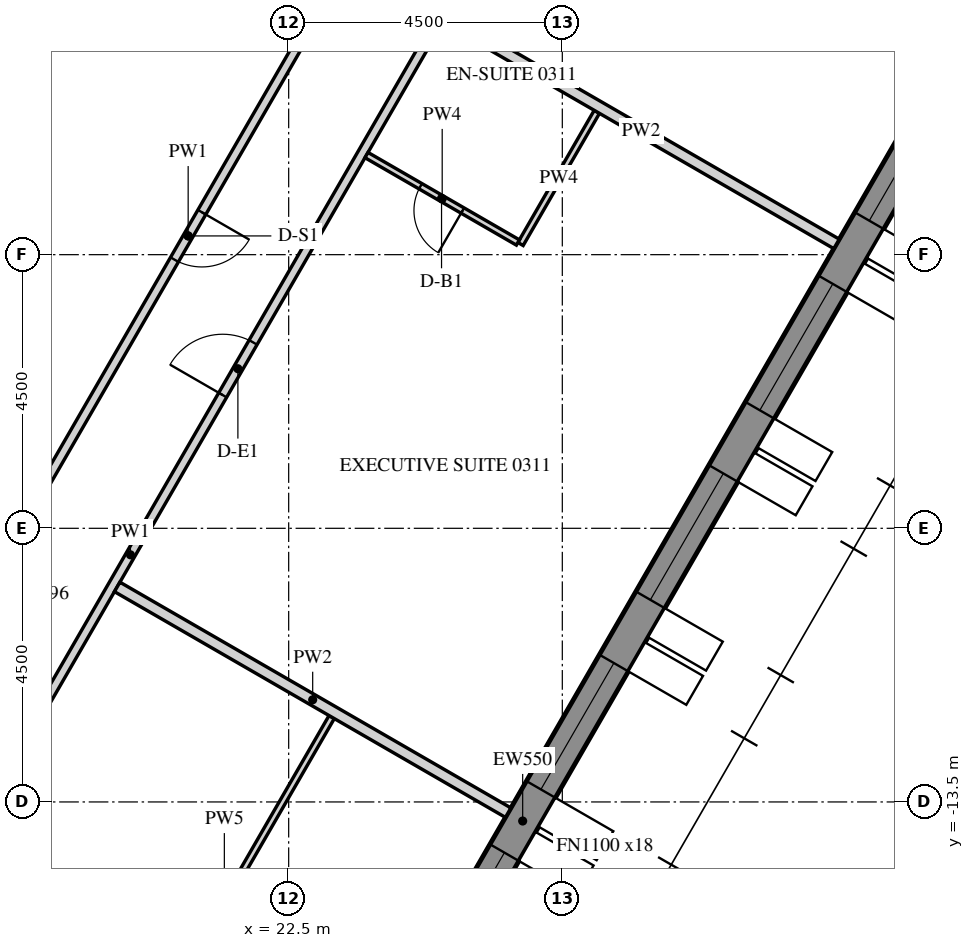
"""IFC4 building model, lengths in metres.
Left out: names, types, materials, properties, quantities, classifications, styles, units other than length and angle.
Written with IfcOpenShell. Run it as: python <this file> out.ifc"""

import sys

from ifc_helpers import new_model, si_unit, direction, frame, frame_2d, origin, place, context, subcontext, project, spatial, polyline, rectangle, outline, extrude, element, fill, save


model = new_model("IFC4")
c1 = context("Model", 3, precision=1e-05, world=origin(), true_north=direction((0.0, 1.0)))
c2 = subcontext(c1, "Body", "Model", "MODEL_VIEW")
j1 = project(units=[si_unit("LENGTHUNIT", "METRE"), si_unit("PLANEANGLEUNIT", "RADIAN")], contexts=[c1])
p1 = place(None, origin())
s1 = spatial("IfcSite", under=j1, at=p1, CompositionType="ELEMENT")
p2 = place(p1, origin())
s2 = spatial("IfcBuilding", under=s1, at=p2, CompositionType="ELEMENT")
p3 = place(p2, frame((0.0, 0.0, 60.9)))
s3 = spatial("IfcBuildingStorey", under=s2, at=p3, CompositionType="ELEMENT", Elevation=60.9)
p4 = place(p3, frame((18.83, -26.835, -0.15), z_axis=(0.0, 0.0, 1.0), x_axis=(0.500003800416, 0.866023209602, 0.0)))
e1 = element("IfcWall", 1, at=p4, inside=s3, PredefinedType="SOLIDWALL", context=c2, shape_type="SweptSolid", body=[
    extrude(outline(polyline([(-0.022, -0.275), (30.097, -0.275), (30.045, 0.275), (0.022, 0.275), (-0.022, -0.275)])), origin(), (0.0, 0.0, 1.0), 3.9),
])
p5 = place(p4, frame((1.236, 0.0, 1.05)))
e2 = element("IfcOpeningElement", 2, at=p5, cuts=e1, PredefinedType="OPENING", context=c2, shape_type="SweptSolid", body=[
    extrude(rectangle(XDim=2.4, YDim=2.4, at=frame_2d((1.2, 1.2))), frame((0.0, 0.285, 0.0), z_axis=(0.0, -1.0, 0.0), x_axis=(1.0, 0.0, 0.0)), (0.0, 0.0, 1.0), 0.57),
])
p6 = place(p4, frame((4.835, 0.0, 1.05)))
e3 = element("IfcOpeningElement", 3, at=p6, cuts=e1, PredefinedType="OPENING", context=c2, shape_type="SweptSolid", body=[
    extrude(rectangle(XDim=2.4, YDim=2.4, at=frame_2d((1.2, 1.2))), frame((0.0, 0.285, 0.0), z_axis=(0.0, -1.0, 0.0), x_axis=(1.0, 0.0, 0.0)), (0.0, 0.0, 1.0), 0.57),
])
p7 = place(p4, frame((8.436, 0.0, 1.05)))
e4 = element("IfcOpeningElement", 4, at=p7, cuts=e1, PredefinedType="OPENING", context=c2, shape_type="SweptSolid", body=[
    extrude(rectangle(XDim=2.4, YDim=2.4, at=frame_2d((1.2, 1.2))), frame((0.0, 0.285, 0.0), z_axis=(0.0, -1.0, 0.0), x_axis=(1.0, 0.0, 0.0)), (0.0, 0.0, 1.0), 0.57),
])
p8 = place(p4, frame((12.035, 0.0, 1.05)))
e5 = element("IfcOpeningElement", 5, at=p8, cuts=e1, PredefinedType="OPENING", context=c2, shape_type="SweptSolid", body=[
    extrude(rectangle(XDim=2.4, YDim=2.4, at=frame_2d((1.2, 1.2))), frame((0.0, 0.285, 0.0), z_axis=(0.0, -1.0, 0.0), x_axis=(1.0, 0.0, 0.0)), (0.0, 0.0, 1.0), 0.57),
])
p9 = place(p4, frame((15.635, 0.0, 1.05)))
e6 = element("IfcOpeningElement", 6, at=p9, cuts=e1, PredefinedType="OPENING", context=c2, shape_type="SweptSolid", body=[
    extrude(rectangle(XDim=2.4, YDim=2.4, at=frame_2d((1.2, 1.2))), frame((0.0, 0.285, 0.0), z_axis=(0.0, -1.0, 0.0), x_axis=(1.0, 0.0, 0.0)), (0.0, 0.0, 1.0), 0.57),
])
p10 = place(p4, frame((19.236, 0.0, 1.05)))
e7 = element("IfcOpeningElement", 7, at=p10, cuts=e1, PredefinedType="OPENING", context=c2, shape_type="SweptSolid", body=[
    extrude(rectangle(XDim=2.4, YDim=2.4, at=frame_2d((1.2, 1.2))), frame((0.0, 0.285, 0.0), z_axis=(0.0, -1.0, 0.0), x_axis=(1.0, 0.0, 0.0)), (0.0, 0.0, 1.0), 0.57),
])
p11 = place(p4, frame((22.835, 0.0, 1.05)))
e8 = element("IfcOpeningElement", 8, at=p11, cuts=e1, PredefinedType="OPENING", context=c2, shape_type="SweptSolid", body=[
    extrude(rectangle(XDim=2.4, YDim=2.4, at=frame_2d((1.2, 1.2))), frame((0.0, 0.285, 0.0), z_axis=(0.0, -1.0, 0.0), x_axis=(1.0, 0.0, 0.0)), (0.0, 0.0, 1.0), 0.57),
])
p12 = place(p4, frame((26.436, 0.0, 1.05)))
e9 = element("IfcOpeningElement", 9, at=p12, cuts=e1, PredefinedType="OPENING", context=c2, shape_type="SweptSolid", body=[
    extrude(rectangle(XDim=2.4, YDim=2.4, at=frame_2d((1.2, 1.2))), frame((0.0, 0.285, 0.0), z_axis=(0.0, -1.0, 0.0), x_axis=(1.0, 0.0, 0.0)), (0.0, 0.0, 1.0), 0.57),
])
p13 = place(p3, frame((13.928, -19.775, 0.0), z_axis=(0.0, 0.0, 1.0), x_axis=(0.50000450071, 0.866022805283, 0.0)))
e10 = element("IfcWall", 10, at=p13, inside=s3, PredefinedType="PARTITIONING", context=c2, shape_type="SweptSolid", body=[
    extrude(rectangle(XDim=23.877, YDim=0.15, at=frame_2d((11.938, 0.0))), origin(), (0.0, 0.0, 1.0), 2.988),
])
p14 = place(p13, frame((6.443, 0.0, 0.0)))
e11 = element("IfcOpeningElement", 11, at=p14, cuts=e10, PredefinedType="OPENING", context=c2, shape_type="SweptSolid", body=[
    extrude(rectangle(XDim=1.0, YDim=2.1, at=frame_2d((0.5, 1.05))), frame((0.0, 0.085, 0.0), z_axis=(0.0, -1.0, 0.0), x_axis=(1.0, 0.0, 0.0)), (0.0, 0.0, 1.0), 0.17),
])
p15 = place(p13, frame((14.972, 0.0, 0.0)))
e12 = element("IfcOpeningElement", 12, at=p15, cuts=e10, PredefinedType="OPENING", context=c2, shape_type="SweptSolid", body=[
    extrude(rectangle(XDim=1.0, YDim=2.1, at=frame_2d((0.5, 1.05))), frame((0.0, 0.085, 0.0), z_axis=(0.0, -1.0, 0.0), x_axis=(1.0, 0.0, 0.0)), (0.0, 0.0, 1.0), 0.17),
])
p16 = place(p3, frame((23.704, 0.757, 0.0), z_axis=(0.0, 0.0, 1.0), x_axis=(-0.500010297365, -0.866019458516, 0.0)))
e13 = element("IfcWall", 13, at=p16, inside=s3, PredefinedType="PARTITIONING", context=c2, shape_type="SweptSolid", body=[
    extrude(rectangle(XDim=11.429, YDim=0.15, at=frame_2d((5.714, 0.0))), origin(), (0.0, 0.0, 1.0), 2.988),
])
p17 = place(p16, frame((5.264, 0.0, 0.0)))
e14 = element("IfcOpeningElement", 14, at=p17, cuts=e13, PredefinedType="OPENING", context=c2, shape_type="SweptSolid", body=[
    extrude(rectangle(XDim=0.9, YDim=2.1, at=frame_2d((0.45, 1.05))), frame((0.0, 0.085, 0.0), z_axis=(0.0, -1.0, 0.0), x_axis=(1.0, 0.0, 0.0)), (0.0, 0.0, 1.0), 0.17),
])
p18 = place(p3, frame((19.677, -18.218, 0.0), z_axis=(0.0, 0.0, 1.0), x_axis=(0.500010820671, 0.866019156377, 0.0)))
e15 = element("IfcWall", 15, at=p18, inside=s3, PredefinedType="PARTITIONING", context=c2, shape_type="SweptSolid", body=[
    extrude(rectangle(XDim=7.06, YDim=0.1, at=frame_2d((3.53, 0.0))), origin(), (0.0, 0.0, 1.0), 2.988),
])
p19 = place(p18, frame((3.1, 0.0, 0.0)))
e16 = element("IfcOpeningElement", 16, at=p19, cuts=e15, PredefinedType="OPENING", context=c2, shape_type="SweptSolid", body=[
    extrude(rectangle(XDim=0.9, YDim=2.1, at=frame_2d((0.45, 1.05))), frame((0.0, 0.06, 0.0), z_axis=(0.0, -1.0, 0.0), x_axis=(1.0, 0.0, 0.0)), (0.0, 0.0, 1.0), 0.12),
])
p20 = place(p3, frame((26.11, -13.676, 0.0), z_axis=(0.0, 0.0, 1.0), x_axis=(-0.866014745021, 0.500018461065, 0.0)))
e17 = element("IfcWall", 17, at=p20, inside=s3, PredefinedType="PARTITIONING", context=c2, shape_type="SweptSolid", body=[
    extrude(rectangle(XDim=7.425, YDim=0.18, at=frame_2d((3.712, 0.0))), origin(), (0.0, 0.0, 1.0), 2.988),
])
p21 = place(p3, frame((27.568, -2.151, 0.0), z_axis=(0.0, 0.0, 1.0), x_axis=(-0.499989096993, -0.866031698547, 0.0)))
e18 = element("IfcWall", 18, at=p21, inside=s3, PredefinedType="PARTITIONING", context=c2, shape_type="SweptSolid", body=[
    extrude(rectangle(XDim=2.51, YDim=0.1, at=frame_2d((1.255, 0.0))), origin(), (0.0, 0.0, 1.0), 2.988),
])
p22 = place(p3, frame((26.27, -4.3, 0.0), z_axis=(0.0, 0.0, 1.0), x_axis=(-0.866018712932, 0.500011588718, 0.0)))
e19 = element("IfcWall", 19, at=p22, inside=s3, PredefinedType="PARTITIONING", context=c2, shape_type="SweptSolid", body=[
    extrude(rectangle(XDim=2.875, YDim=0.1, at=frame_2d((1.438, 0.0))), origin(), (0.0, 0.0, 1.0), 2.988),
])
p23 = place(p22, frame((1.05, 0.0, 0.0)))
e20 = element("IfcOpeningElement", 20, at=p23, cuts=e19, PredefinedType="OPENING", context=c2, shape_type="SweptSolid", body=[
    extrude(rectangle(XDim=0.8, YDim=2.1, at=frame_2d((0.4, 1.05))), frame((0.0, 0.06, 0.0), z_axis=(0.0, -1.0, 0.0), x_axis=(1.0, 0.0, 0.0)), (0.0, 0.0, 1.0), 0.12),
])
p24 = place(p3, frame((31.51, -4.323, 0.0), z_axis=(0.0, 0.0, 1.0), x_axis=(-0.866028983062, 0.499993800457, 0.0)))
e21 = element("IfcWall", 21, at=p24, inside=s3, PredefinedType="PARTITIONING", context=c2, shape_type="SweptSolid", body=[
    extrude(rectangle(XDim=7.425, YDim=0.18, at=frame_2d((3.712, 0.0))), origin(), (0.0, 0.0, 1.0), 2.988),
])
p25 = place(p8, frame((0.0, 0.205, 0.0)))
e22 = element("IfcWindow", 22, at=p25, inside=s3, PartitioningType="DOUBLE_PANEL_VERTICAL", PredefinedType="WINDOW", context=c2, shape_type="SweptSolid", body=[
    extrude(rectangle(XDim=2.4, YDim=2.4, at=frame_2d((1.2, 1.2))), frame((0.0, 0.03, 0.0), z_axis=(0.0, -1.0, 0.0), x_axis=(1.0, 0.0, 0.0)), (0.0, 0.0, 1.0), 0.06),
])
fill(e5, e22)
p26 = place(p9, frame((0.0, 0.205, 0.0)))
e23 = element("IfcWindow", 23, at=p26, inside=s3, PartitioningType="DOUBLE_PANEL_VERTICAL", PredefinedType="WINDOW", context=c2, shape_type="SweptSolid", body=[
    extrude(rectangle(XDim=2.4, YDim=2.4, at=frame_2d((1.2, 1.2))), frame((0.0, 0.03, 0.0), z_axis=(0.0, -1.0, 0.0), x_axis=(1.0, 0.0, 0.0)), (0.0, 0.0, 1.0), 0.06),
])
fill(e6, e23)
p27 = place(p10, frame((0.0, 0.205, 0.0)))
e24 = element("IfcWindow", 24, at=p27, inside=s3, PartitioningType="DOUBLE_PANEL_VERTICAL", PredefinedType="WINDOW", context=c2, shape_type="SweptSolid", body=[
    extrude(rectangle(XDim=2.4, YDim=2.4, at=frame_2d((1.2, 1.2))), frame((0.0, 0.03, 0.0), z_axis=(0.0, -1.0, 0.0), x_axis=(1.0, 0.0, 0.0)), (0.0, 0.0, 1.0), 0.06),
])
fill(e7, e24)
p28 = place(p11, frame((0.0, 0.205, 0.0)))
e25 = element("IfcWindow", 25, at=p28, inside=s3, PartitioningType="DOUBLE_PANEL_VERTICAL", PredefinedType="WINDOW", context=c2, shape_type="SweptSolid", body=[
    extrude(rectangle(XDim=2.4, YDim=2.4, at=frame_2d((1.2, 1.2))), frame((0.0, 0.03, 0.0), z_axis=(0.0, -1.0, 0.0), x_axis=(1.0, 0.0, 0.0)), (0.0, 0.0, 1.0), 0.06),
])
fill(e8, e25)
p29 = place(p12, frame((0.0, 0.205, 0.0)))
e26 = element("IfcWindow", 26, at=p29, inside=s3, PartitioningType="DOUBLE_PANEL_VERTICAL", PredefinedType="WINDOW", context=c2, shape_type="SweptSolid", body=[
    extrude(rectangle(XDim=2.4, YDim=2.4, at=frame_2d((1.2, 1.2))), frame((0.0, 0.03, 0.0), z_axis=(0.0, -1.0, 0.0), x_axis=(1.0, 0.0, 0.0)), (0.0, 0.0, 1.0), 0.06),
])
fill(e9, e26)
p30 = place(p15, origin())
e27 = element("IfcDoor", 27, at=p30, inside=s3, OperationType="SINGLE_SWING_LEFT", PredefinedType="DOOR", context=c2, shape_type="SweptSolid", body=[
    extrude(rectangle(XDim=1.0, YDim=2.1, at=frame_2d((0.5, 1.05))), frame((0.0, 0.025, 0.0), z_axis=(0.0, -1.0, 0.0), x_axis=(1.0, 0.0, 0.0)), (0.0, 0.0, 1.0), 0.05),
])
fill(e12, e27)
p31 = place(p23, origin())
e28 = element("IfcDoor", 28, at=p31, inside=s3, OperationType="SINGLE_SWING_LEFT", PredefinedType="DOOR", context=c2, shape_type="SweptSolid", body=[
    extrude(rectangle(XDim=0.8, YDim=2.1, at=frame_2d((0.4, 1.05))), frame((0.0, 0.025, 0.0), z_axis=(0.0, -1.0, 0.0), x_axis=(1.0, 0.0, 0.0)), (0.0, 0.0, 1.0), 0.05),
])
fill(e20, e28)
p32 = place(p17, origin())
e29 = element("IfcDoor", 29, at=p32, inside=s3, OperationType="SINGLE_SWING_LEFT", PredefinedType="DOOR", context=c2, shape_type="SweptSolid", body=[
    extrude(rectangle(XDim=0.9, YDim=2.1, at=frame_2d((0.45, 1.05))), frame((0.0, 0.025, 0.0), z_axis=(0.0, -1.0, 0.0), x_axis=(1.0, 0.0, 0.0)), (0.0, 0.0, 1.0), 0.05),
])
fill(e14, e29)
save(model, sys.argv[1])
